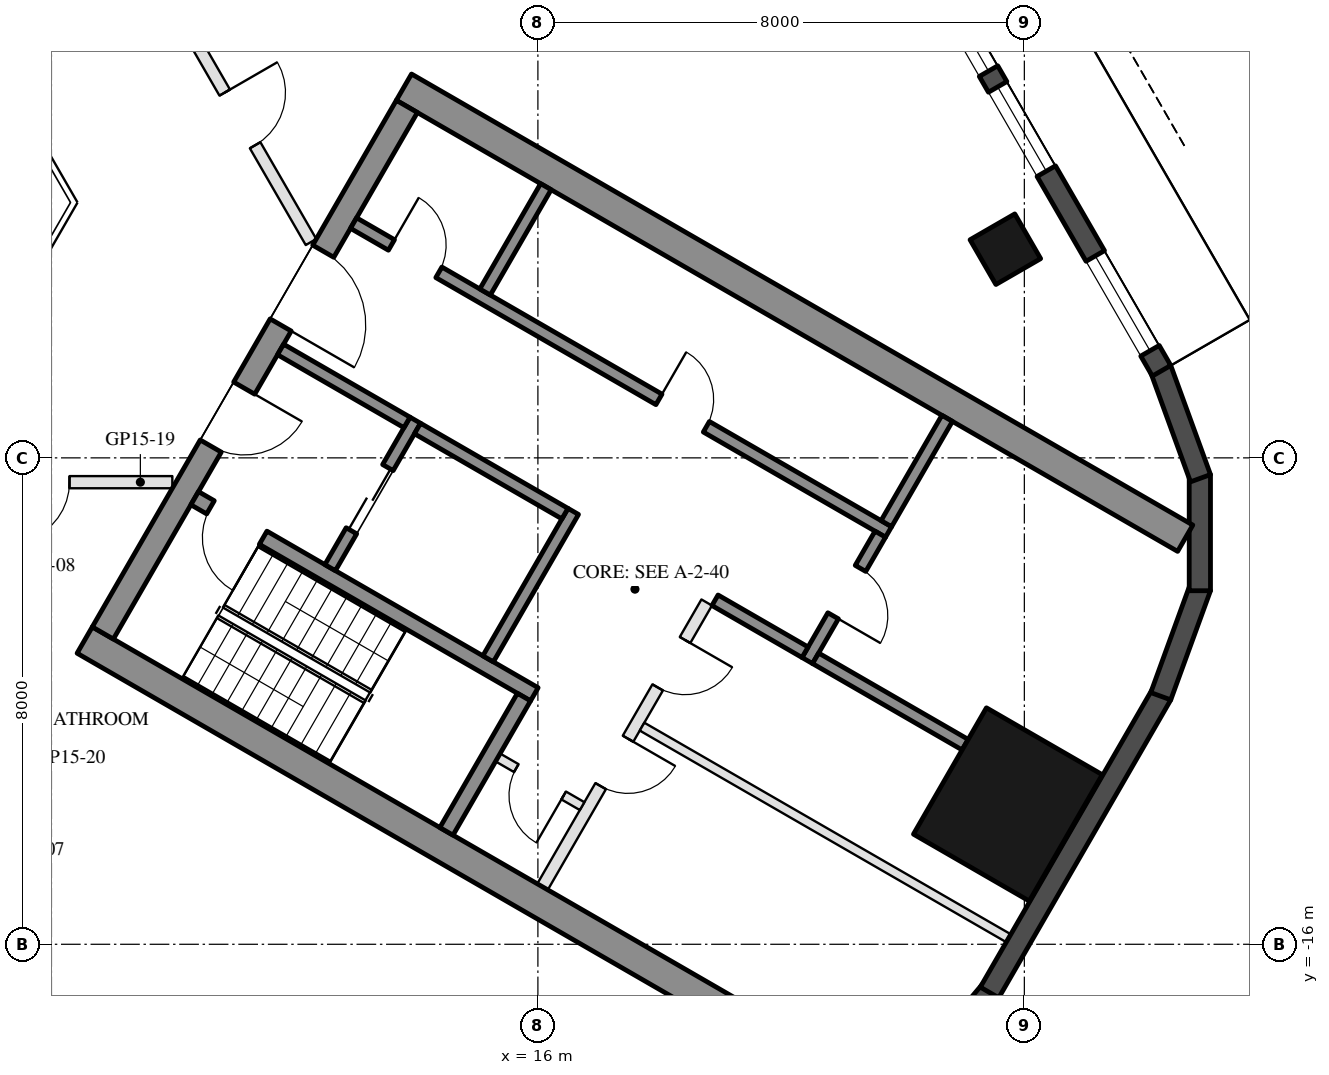
"""IFC4 building model, lengths in metres.
Left out: names, types, materials, properties, quantities, classifications, styles, units other than length and angle.
Written with IfcOpenShell. Run it as: python <this file> out.ifc"""

import sys

from ifc_helpers import new_model, si_unit, direction, frame, frame_2d, origin, origin_2d, place, context, subcontext, project, spatial, rectangle, hollow_rectangle, extrude, element, fill, save


model = new_model("IFC4")
c1 = context("Model", 3, precision=1e-05, world=origin(), true_north=direction((0.0, 1.0)))
c2 = subcontext(c1, "Body", "Model", "MODEL_VIEW")
j1 = project(units=[si_unit("LENGTHUNIT", "METRE"), si_unit("PLANEANGLEUNIT", "RADIAN")], contexts=[c1])
p1 = place(None, origin())
s1 = spatial("IfcSite", under=j1, at=p1, CompositionType="ELEMENT")
p2 = place(p1, origin())
s2 = spatial("IfcBuilding", under=s1, at=p2, CompositionType="ELEMENT")
p3 = place(p2, frame((0.0, 0.0, 172.5)))
s3 = spatial("IfcBuildingStorey", under=s2, at=p3, CompositionType="ELEMENT", Elevation=172.5)
p4 = place(p3, frame((23.688, -4.568, 0.0), z_axis=(0.0, 0.0, 1.0), x_axis=(-0.5, 0.866025403784, 0.0)))
e1 = element("IfcColumn", 1, at=p4, inside=s3, PredefinedType="COLUMN", context=c2, shape_type="SweptSolid", body=[
    extrude(hollow_rectangle(XDim=0.85, YDim=0.85, WallThickness=0.04, at=origin_2d()), origin(), (0.0, 0.0, 1.0), 3.7),
])
p5 = place(p3, frame((23.729, -13.7, 0.0), z_axis=(0.0, 0.0, 1.0), x_axis=(0.5, 0.866025403784, 0.0)))
e2 = element("IfcColumn", 2, at=p5, inside=s3, PredefinedType="COLUMN", context=c2, shape_type="SweptSolid", body=[
    extrude(hollow_rectangle(XDim=2.4, YDim=2.2, WallThickness=0.06, at=origin_2d()), origin(), (0.0, 0.0, 1.0), 3.7),
])
p6 = place(p3, frame((22.217, -18.231, 0.0), z_axis=(0.0, 0.0, 1.0), x_axis=(0.642733291068, 0.76609001857, 0.0)))
e3 = element("IfcWall", 3, at=p6, inside=s3, PredefinedType="SOLIDWALL", context=c2, shape_type="SweptSolid", body=[
    extrude(rectangle(XDim=1.91, YDim=0.35, at=frame_2d((0.955, 0.0))), origin(), (0.0, 0.0, 1.0), 3.55),
])
p7 = place(p3, frame((23.427, -16.792, 0.0), z_axis=(0.0, 0.0, 1.0), x_axis=(0.500018773155, 0.866014564827, 0.0)))
e4 = element("IfcWall", 4, at=p7, inside=s3, PredefinedType="SOLIDWALL", context=c2, shape_type="SweptSolid", body=[
    extrude(rectangle(XDim=5.658, YDim=0.35, at=frame_2d((2.829, 0.0))), origin(), (0.0, 0.0, 1.0), 3.55),
])
for number, where, z_axis, x_axis in (
    (5, (26.244, -11.92, 0.0), (0.0, 0.0, 1.0), (0.342, 0.94, 0.0)),
    (6, (26.886, -10.185, 0.0), (0.0, 0.0, 1.0), (0.0, 1.0, 0.0)),
    (7, (26.897, -8.335, 0.0), (0.0, 0.0, 1.0), (-0.342, 0.94, 0.0)),
):
    element("IfcWall", number, at=place(p3, frame(where, z_axis=z_axis, x_axis=x_axis)), inside=s3, PredefinedType="SOLIDWALL", context=c2, shape_type="SweptSolid", body=[
        extrude(rectangle(XDim=1.91, YDim=0.35, at=frame_2d((0.955, 0.0))), origin(), (0.0, 0.0, 1.0), 3.55),
    ])
p8 = place(p3, frame((26.257, -6.567, 0.0), z_axis=(0.0, 0.0, 1.0), x_axis=(-0.500023526245, 0.866011820475, 0.0)))
e8 = element("IfcWall", 8, at=p8, inside=s3, PredefinedType="SOLIDWALL", context=c2, shape_type="SweptSolid", body=[
    extrude(rectangle(XDim=11.816, YDim=0.35, at=frame_2d((5.908, 0.0))), origin(), (0.0, 0.0, 1.0), 3.55),
])
p9 = place(p8, frame((0.38, 0.0, 0.3)))
e9 = element("IfcOpeningElement", 9, at=p9, cuts=e8, PredefinedType="OPENING", context=c2, shape_type="SweptSolid", body=[
    extrude(rectangle(XDim=1.8, YDim=2.65, at=frame_2d((0.9, 1.325))), frame((0.0, 0.185, 0.0), z_axis=(0.0, -1.0, 0.0), x_axis=(1.0, 0.0, 0.0)), (0.0, 0.0, 1.0), 0.37),
])
p10 = place(p8, frame((7.741, 0.0, 0.0)))
e10 = element("IfcOpeningElement", 10, at=p10, cuts=e8, PredefinedType="OPENING", context=c2, shape_type="SweptSolid", body=[
    extrude(rectangle(XDim=2.4, YDim=2.4, at=frame_2d((1.2, 1.2))), frame((0.0, 0.185, 0.0), z_axis=(0.0, -1.0, 0.0), x_axis=(1.0, 0.0, 0.0)), (0.0, 0.0, 1.0), 0.37),
])
p11 = place(p8, frame((3.791, 0.0, 0.3)))
e11 = element("IfcOpeningElement", 11, at=p11, cuts=e8, PredefinedType="OPENING", context=c2, shape_type="SweptSolid", body=[
    extrude(rectangle(XDim=1.6, YDim=2.65, at=frame_2d((0.8, 1.325))), frame((0.0, 0.185, 0.0), z_axis=(0.0, -1.0, 0.0), x_axis=(1.0, 0.0, 0.0)), (0.0, 0.0, 1.0), 0.37),
])
p12 = place(p8, frame((5.691, 0.0, 0.3)))
e12 = element("IfcOpeningElement", 12, at=p12, cuts=e8, PredefinedType="OPENING", context=c2, shape_type="SweptSolid", body=[
    extrude(rectangle(XDim=1.6, YDim=2.65, at=frame_2d((0.8, 1.325))), frame((0.0, 0.185, 0.0), z_axis=(0.0, -1.0, 0.0), x_axis=(1.0, 0.0, 0.0)), (0.0, 0.0, 1.0), 0.37),
])
for number, where, z_axis, x_axis in (
    (13, (8.547, -10.997, 0.0), (0.0, 0.0, 1.0), (0.866, -0.5, 0.0)),
    (14, (13.797, -1.903, 0.0), (0.0, 0.0, 1.0), (0.866, -0.5, 0.0)),
):
    element("IfcWall", number, at=place(p3, frame(where, z_axis=z_axis, x_axis=x_axis)), inside=s3, PredefinedType="SHEAR", context=c2, shape_type="SweptSolid", body=[
        extrude(rectangle(XDim=14.837, YDim=0.5, at=frame_2d((7.418, 0.0))), origin(), (0.0, 0.0, 1.0), 3.5),
    ])
p13 = place(p3, frame((8.845, -10.88, 0.0), z_axis=(0.0, 0.0, 1.0), x_axis=(0.500004234368, 0.866022959057, 0.0)))
e15 = element("IfcWall", 15, at=p13, inside=s3, PredefinedType="SHEAR", context=c2, shape_type="SweptSolid", body=[
    extrude(rectangle(XDim=10.0, YDim=0.4, at=frame_2d((5.0, 0.0))), origin(), (0.0, 0.0, 1.0), 3.5),
])
p14 = place(p13, frame((3.55, 0.0, 0.0)))
e16 = element("IfcOpeningElement", 16, at=p14, cuts=e15, PredefinedType="OPENING", context=c2, shape_type="SweptSolid", body=[
    extrude(rectangle(XDim=1.1, YDim=2.1, at=frame_2d((0.55, 1.05))), frame((0.0, 0.21, 0.0), z_axis=(0.0, -1.0, 0.0), x_axis=(1.0, 0.0, 0.0)), (0.0, 0.0, 1.0), 0.42),
])
p15 = place(p13, frame((5.85, 0.0, 0.0)))
e17 = element("IfcOpeningElement", 17, at=p15, cuts=e15, PredefinedType="OPENING", context=c2, shape_type="SweptSolid", body=[
    extrude(rectangle(XDim=1.4, YDim=2.1, at=frame_2d((0.7, 1.05))), frame((0.0, 0.21, 0.0), z_axis=(0.0, -1.0, 0.0), x_axis=(1.0, 0.0, 0.0)), (0.0, 0.0, 1.0), 0.42),
])
p16 = place(p3, frame((10.356, -8.664, 0.0), z_axis=(0.0, 0.0, 1.0), x_axis=(0.866028629588, -0.499994412703, 0.0)))
e18 = element("IfcWall", 18, at=p16, inside=s3, PredefinedType="SHEAR", context=c2, shape_type="SweptSolid", body=[
    extrude(rectangle(XDim=6.45, YDim=0.25, at=frame_2d((3.225, 0.0))), origin(), (0.0, 0.0, 1.0), 3.5),
])
p17 = place(p16, frame((0.3, 0.0, 0.0)))
e19 = element("IfcOpeningElement", 19, at=p17, cuts=e18, PredefinedType="OPENING", context=c2, shape_type="SweptSolid", body=[
    extrude(rectangle(XDim=1.0, YDim=2.1, at=frame_2d((0.5, 1.05))), frame((0.0, 0.135, 0.0), z_axis=(0.0, -1.0, 0.0), x_axis=(1.0, 0.0, 0.0)), (0.0, 0.0, 1.0), 0.27),
])
p18 = place(p3, frame((14.496, -14.143, 0.0), z_axis=(0.0, 0.0, 1.0), x_axis=(0.500062241894, 0.865989465428, 0.0)))
e20 = element("IfcWall", 20, at=p18, inside=s3, PredefinedType="SHEAR", context=c2, shape_type="SweptSolid", body=[
    extrude(rectangle(XDim=2.55, YDim=0.25, at=frame_2d((1.275, 0.0))), origin(), (0.0, 0.0, 1.0), 3.5),
])
p19 = place(p3, frame((15.181, -11.305, 0.0), z_axis=(0.0, 0.0, 1.0), x_axis=(0.49994636267, 0.866056369097, 0.0)))
e21 = element("IfcWall", 21, at=p19, inside=s3, PredefinedType="SHEAR", context=c2, shape_type="SweptSolid", body=[
    extrude(rectangle(XDim=2.8, YDim=0.2, at=frame_2d((1.4, 0.0))), origin(), (0.0, 0.0, 1.0), 3.5),
])
p20 = place(p3, frame((12.583, -9.805, 0.0), z_axis=(0.0, 0.0, 1.0), x_axis=(0.49994636267, 0.866056369097, 0.0)))
e22 = element("IfcWall", 22, at=p20, inside=s3, PredefinedType="SHEAR", context=c2, shape_type="SweptSolid", body=[
    extrude(rectangle(XDim=2.8, YDim=0.2, at=frame_2d((1.4, 0.0))), origin(), (0.0, 0.0, 1.0), 3.5),
])
p21 = place(p20, frame((0.7, 0.0, 0.0)))
e23 = element("IfcOpeningElement", 23, at=p21, cuts=e22, PredefinedType="OPENING", context=c2, shape_type="SweptSolid", body=[
    extrude(rectangle(XDim=1.2, YDim=2.1, at=frame_2d((0.6, 1.05))), frame((0.0, 0.11, 0.0), z_axis=(0.0, -1.0, 0.0), x_axis=(1.0, 0.0, 0.0)), (0.0, 0.0, 1.0), 0.22),
])
p22 = place(p3, frame((11.768, -6.217, 0.0), z_axis=(0.0, 0.0, 1.0), x_axis=(0.866050077142, -0.499957262057, 0.0)))
e24 = element("IfcWall", 24, at=p22, inside=s3, PredefinedType="SHEAR", context=c2, shape_type="SweptSolid", body=[
    extrude(rectangle(XDim=2.4, YDim=0.2, at=frame_2d((1.2, 0.0))), origin(), (0.0, 0.0, 1.0), 3.5),
])
p23 = place(p3, frame((14.02, -7.517, 0.0), z_axis=(0.0, 0.0, 1.0), x_axis=(0.866034573852, -0.49998411664, 0.0)))
e25 = element("IfcWall", 25, at=p23, inside=s3, PredefinedType="SHEAR", context=c2, shape_type="SweptSolid", body=[
    extrude(rectangle(XDim=2.8, YDim=0.2, at=frame_2d((1.4, 0.0))), origin(), (0.0, 0.0, 1.0), 3.5),
])
p24 = place(p3, frame((12.968, -4.138, 0.0), z_axis=(0.0, 0.0, 1.0), x_axis=(0.866028328073, -0.49999493495, 0.0)))
e26 = element("IfcWall", 26, at=p24, inside=s3, PredefinedType="SHEAR", context=c2, shape_type="SweptSolid", body=[
    extrude(rectangle(XDim=10.16, YDim=0.2, at=frame_2d((5.08, 0.0))), origin(), (0.0, 0.0, 1.0), 3.5),
])
p25 = place(p24, frame((0.72, 0.0, 0.0)))
e27 = element("IfcOpeningElement", 27, at=p25, cuts=e26, PredefinedType="OPENING", context=c2, shape_type="SweptSolid", body=[
    extrude(rectangle(XDim=0.9, YDim=2.1, at=frame_2d((0.45, 1.05))), frame((0.0, 0.11, 0.0), z_axis=(0.0, -1.0, 0.0), x_axis=(1.0, 0.0, 0.0)), (0.0, 0.0, 1.0), 0.22),
])
p26 = place(p24, frame((5.8, 0.0, 0.0)))
e28 = element("IfcOpeningElement", 28, at=p26, cuts=e26, PredefinedType="OPENING", context=c2, shape_type="SweptSolid", body=[
    extrude(rectangle(XDim=0.9, YDim=2.1, at=frame_2d((0.45, 1.05))), frame((0.0, 0.11, 0.0), z_axis=(0.0, -1.0, 0.0), x_axis=(1.0, 0.0, 0.0)), (0.0, 0.0, 1.0), 0.22),
])
p27 = place(p3, frame((20.43, -11.333, 0.0), z_axis=(0.0, 0.0, 1.0), x_axis=(0.500001309137, 0.866024647952, 0.0)))
e29 = element("IfcWall", 29, at=p27, inside=s3, PredefinedType="SHEAR", context=c2, shape_type="SweptSolid", body=[
    extrude(rectangle(XDim=2.4, YDim=0.2, at=frame_2d((1.2, 0.0))), origin(), (0.0, 0.0, 1.0), 3.5),
])
p28 = place(p27, frame((0.85, 0.0, 0.0)))
e30 = element("IfcOpeningElement", 30, at=p28, cuts=e29, PredefinedType="OPENING", context=c2, shape_type="SweptSolid", body=[
    extrude(rectangle(XDim=0.9, YDim=2.1, at=frame_2d((0.45, 1.05))), frame((0.0, 0.11, 0.0), z_axis=(0.0, -1.0, 0.0), x_axis=(1.0, 0.0, 0.0)), (0.0, 0.0, 1.0), 0.22),
])
p29 = place(p3, frame((18.913, -10.342, 0.0), z_axis=(0.0, 0.0, 1.0), x_axis=(0.866038183914, -0.499977863513, 0.0)))
e31 = element("IfcWall", 31, at=p29, inside=s3, PredefinedType="SHEAR", context=c2, shape_type="SweptSolid", body=[
    extrude(rectangle(XDim=1.71, YDim=0.2, at=frame_2d((0.855, 0.0))), origin(), (0.0, 0.0, 1.0), 3.5),
])
for number, where, z_axis, x_axis in (
    (32, (15.131, -5.272, 0.0), (0.0, 0.0, 1.0), (0.5, 0.866, 0.0)),
    (33, (21.73, -9.082, 0.0), (0.0, 0.0, 1.0), (0.5, 0.866, 0.0)),
):
    element("IfcWall", number, at=place(p3, frame(where, z_axis=z_axis, x_axis=x_axis)), inside=s3, PredefinedType="SHEAR", context=c2, shape_type="SweptSolid", body=[
        extrude(rectangle(XDim=2.0, YDim=0.2, at=frame_2d((1.0, 0.0))), origin(), (0.0, 0.0, 1.0), 3.5),
    ])
p30 = place(p3, frame((20.567, -11.297, 0.0), z_axis=(0.0, 0.0, 1.0), x_axis=(0.866055327414, -0.49994816717, 0.0)))
e34 = element("IfcWall", 34, at=p30, inside=s3, PredefinedType="SHEAR", context=c2, shape_type="SweptSolid", body=[
    extrude(rectangle(XDim=2.84, YDim=0.2, at=frame_2d((1.42, 0.0))), origin(), (0.0, 0.0, 1.0), 3.5),
])
p31 = place(p3, frame((16.076, -15.055, 0.0), z_axis=(0.0, 0.0, 1.0), x_axis=(0.499995103361, 0.866028230842, 0.0)))
e35 = element("IfcWall", 35, at=p31, inside=s3, PredefinedType="PARTITIONING", context=c2, shape_type="SweptSolid", body=[
    extrude(rectangle(XDim=5.4, YDim=0.2, at=frame_2d((2.7, 0.0))), origin(), (0.0, 0.0, 1.0), 3.5),
])
p32 = place(p31, frame((1.913, 0.0, 0.0)))
e36 = element("IfcOpeningElement", 36, at=p32, cuts=e35, PredefinedType="OPENING", context=c2, shape_type="SweptSolid", body=[
    extrude(rectangle(XDim=0.9, YDim=2.1, at=frame_2d((0.45, 1.05))), frame((0.0, 0.11, 0.0), z_axis=(0.0, -1.0, 0.0), x_axis=(1.0, 0.0, 0.0)), (0.0, 0.0, 1.0), 0.22),
])
p33 = place(p31, frame((3.788, 0.0, 0.0)))
e37 = element("IfcOpeningElement", 37, at=p33, cuts=e35, PredefinedType="OPENING", context=c2, shape_type="SweptSolid", body=[
    extrude(rectangle(XDim=0.9, YDim=2.1, at=frame_2d((0.45, 1.05))), frame((0.0, 0.11, 0.0), z_axis=(0.0, -1.0, 0.0), x_axis=(1.0, 0.0, 0.0)), (0.0, 0.0, 1.0), 0.22),
])
p34 = place(p3, frame((15.342, -12.928, 0.0), z_axis=(0.0, 0.0, 1.0), x_axis=(0.865989903783, -0.500061482766, 0.0)))
e38 = element("IfcWall", 38, at=p34, inside=s3, PredefinedType="PARTITIONING", context=c2, shape_type="SweptSolid", body=[
    extrude(rectangle(XDim=1.6, YDim=0.15, at=frame_2d((0.8, 0.0))), origin(), (0.0, 0.0, 1.0), 3.5),
])
p35 = place(p34, frame((0.35, 0.0, 0.0)))
e39 = element("IfcOpeningElement", 39, at=p35, cuts=e38, PredefinedType="OPENING", context=c2, shape_type="SweptSolid", body=[
    extrude(rectangle(XDim=0.9, YDim=2.1, at=frame_2d((0.45, 1.05))), frame((0.0, 0.085, 0.0), z_axis=(0.0, -1.0, 0.0), x_axis=(1.0, 0.0, 0.0)), (0.0, 0.0, 1.0), 0.17),
])
p36 = place(p3, frame((17.713, -12.42, 0.0), z_axis=(0.0, 0.0, 1.0), x_axis=(0.866016523273, -0.500015381182, 0.0)))
e40 = element("IfcWall", 40, at=p36, inside=s3, PredefinedType="PARTITIONING", context=c2, shape_type="SweptSolid", body=[
    extrude(rectangle(XDim=6.95, YDim=0.15, at=frame_2d((3.475, 0.0))), origin(), (0.0, 0.0, 1.0), 3.5),
])
p37 = place(p3, frame((9.988, -8.4, 0.0), z_axis=(0.0, 0.0, 1.0), x_axis=(-1.0, 0.0, 0.0)))
e41 = element("IfcWall", 41, at=p37, inside=s3, PredefinedType="PARTITIONING", context=c2, shape_type="SweptSolid", body=[
    extrude(rectangle(XDim=4.383, YDim=0.2, at=frame_2d((2.191, 0.0))), origin(), (0.0, 0.0, 1.0), 2.95),
])
p38 = place(p37, frame((1.691, 0.0, 0.0)))
e42 = element("IfcOpeningElement", 42, at=p38, cuts=e41, PredefinedType="OPENING", context=c2, shape_type="SweptSolid", body=[
    extrude(rectangle(XDim=1.0, YDim=2.1, at=frame_2d((0.5, 1.05))), frame((0.0, 0.11, 0.0), z_axis=(0.0, -1.0, 0.0), x_axis=(1.0, 0.0, 0.0)), (0.0, 0.0, 1.0), 0.22),
])
p39 = place(p3, frame((9.931, -0.401, 0.0), z_axis=(0.0, 0.0, 1.0), x_axis=(0.5000418389, -0.866001246737, 0.0)))
e43 = element("IfcWall", 43, at=p39, inside=s3, PredefinedType="PARTITIONING", context=c2, shape_type="SweptSolid", body=[
    extrude(rectangle(XDim=4.676, YDim=0.2, at=frame_2d((2.338, 0.0))), origin(), (0.0, 0.0, 1.0), 2.95),
])
p40 = place(p39, frame((1.838, 0.0, 0.0)))
e44 = element("IfcOpeningElement", 44, at=p40, cuts=e43, PredefinedType="OPENING", context=c2, shape_type="SweptSolid", body=[
    extrude(rectangle(XDim=1.0, YDim=2.1, at=frame_2d((0.5, 1.05))), frame((0.0, 0.11, 0.0), z_axis=(0.0, -1.0, 0.0), x_axis=(1.0, 0.0, 0.0)), (0.0, 0.0, 1.0), 0.22),
])
p41 = place(p9, origin())
e45 = element("IfcWindow", 45, at=p41, inside=s3, PartitioningType="SINGLE_PANEL", PredefinedType="WINDOW", context=c2, shape_type="SweptSolid", body=[
    extrude(rectangle(XDim=1.8, YDim=2.65, at=frame_2d((0.9, 1.325))), frame((0.0, 0.03, 0.0), z_axis=(0.0, -1.0, 0.0), x_axis=(1.0, 0.0, 0.0)), (0.0, 0.0, 1.0), 0.06),
])
fill(e9, e45)
p42 = place(p11, origin())
e46 = element("IfcWindow", 46, at=p42, inside=s3, PartitioningType="SINGLE_PANEL", PredefinedType="WINDOW", context=c2, shape_type="SweptSolid", body=[
    extrude(rectangle(XDim=1.6, YDim=2.65, at=frame_2d((0.8, 1.325))), frame((0.0, 0.03, 0.0), z_axis=(0.0, -1.0, 0.0), x_axis=(1.0, 0.0, 0.0)), (0.0, 0.0, 1.0), 0.06),
])
fill(e11, e46)
p43 = place(p12, origin())
e47 = element("IfcWindow", 47, at=p43, inside=s3, PartitioningType="SINGLE_PANEL", PredefinedType="WINDOW", context=c2, shape_type="SweptSolid", body=[
    extrude(rectangle(XDim=1.6, YDim=2.65, at=frame_2d((0.8, 1.325))), frame((0.0, 0.03, 0.0), z_axis=(0.0, -1.0, 0.0), x_axis=(1.0, 0.0, 0.0)), (0.0, 0.0, 1.0), 0.06),
])
fill(e12, e47)
p44 = place(p21, origin())
e48 = element("IfcDoor", 48, at=p44, inside=s3, OperationType="DOUBLE_DOOR_SLIDING", PredefinedType="DOOR", context=c2, shape_type="SweptSolid", body=[
    extrude(rectangle(XDim=1.2, YDim=2.1, at=frame_2d((0.6, 1.05))), frame((0.0, 0.025, 0.0), z_axis=(0.0, -1.0, 0.0), x_axis=(1.0, 0.0, 0.0)), (0.0, 0.0, 1.0), 0.05),
])
fill(e23, e48)
p45 = place(p35, frame((0.9, 0.0, 0.0), z_axis=(0.0, 0.0, 1.0), x_axis=(-1.0, 0.0, 0.0)))
e49 = element("IfcDoor", 49, at=p45, inside=s3, OperationType="SINGLE_SWING_LEFT", PredefinedType="DOOR", context=c2, shape_type="SweptSolid", body=[
    extrude(rectangle(XDim=0.9, YDim=2.1, at=frame_2d((0.45, 1.05))), frame((0.0, 0.025, 0.0), z_axis=(0.0, -1.0, 0.0), x_axis=(1.0, 0.0, 0.0)), (0.0, 0.0, 1.0), 0.05),
])
fill(e39, e49)
p46 = place(p25, origin())
e50 = element("IfcDoor", 50, at=p46, inside=s3, OperationType="SINGLE_SWING_LEFT", PredefinedType="DOOR", context=c2, shape_type="SweptSolid", body=[
    extrude(rectangle(XDim=0.9, YDim=2.1, at=frame_2d((0.45, 1.05))), frame((0.0, 0.025, 0.0), z_axis=(0.0, -1.0, 0.0), x_axis=(1.0, 0.0, 0.0)), (0.0, 0.0, 1.0), 0.05),
])
fill(e27, e50)
p47 = place(p26, origin())
e51 = element("IfcDoor", 51, at=p47, inside=s3, OperationType="SINGLE_SWING_LEFT", PredefinedType="DOOR", context=c2, shape_type="SweptSolid", body=[
    extrude(rectangle(XDim=0.9, YDim=2.1, at=frame_2d((0.45, 1.05))), frame((0.0, 0.025, 0.0), z_axis=(0.0, -1.0, 0.0), x_axis=(1.0, 0.0, 0.0)), (0.0, 0.0, 1.0), 0.05),
])
fill(e28, e51)
p48 = place(p28, frame((0.9, 0.0, 0.0), z_axis=(0.0, 0.0, 1.0), x_axis=(-1.0, 0.0, 0.0)))
e52 = element("IfcDoor", 52, at=p48, inside=s3, OperationType="SINGLE_SWING_RIGHT", PredefinedType="DOOR", context=c2, shape_type="SweptSolid", body=[
    extrude(rectangle(XDim=0.9, YDim=2.1, at=frame_2d((0.45, 1.05))), frame((0.0, 0.025, 0.0), z_axis=(0.0, -1.0, 0.0), x_axis=(1.0, 0.0, 0.0)), (0.0, 0.0, 1.0), 0.05),
])
fill(e30, e52)
p49 = place(p32, frame((0.9, 0.0, 0.0), z_axis=(0.0, 0.0, 1.0), x_axis=(-1.0, 0.0, 0.0)))
e53 = element("IfcDoor", 53, at=p49, inside=s3, OperationType="SINGLE_SWING_LEFT", PredefinedType="DOOR", context=c2, shape_type="SweptSolid", body=[
    extrude(rectangle(XDim=0.9, YDim=2.1, at=frame_2d((0.45, 1.05))), frame((0.0, 0.025, 0.0), z_axis=(0.0, -1.0, 0.0), x_axis=(1.0, 0.0, 0.0)), (0.0, 0.0, 1.0), 0.05),
])
fill(e36, e53)
p50 = place(p33, frame((0.9, 0.0, 0.0), z_axis=(0.0, 0.0, 1.0), x_axis=(-1.0, 0.0, 0.0)))
e54 = element("IfcDoor", 54, at=p50, inside=s3, OperationType="SINGLE_SWING_LEFT", PredefinedType="DOOR", context=c2, shape_type="SweptSolid", body=[
    extrude(rectangle(XDim=0.9, YDim=2.1, at=frame_2d((0.45, 1.05))), frame((0.0, 0.025, 0.0), z_axis=(0.0, -1.0, 0.0), x_axis=(1.0, 0.0, 0.0)), (0.0, 0.0, 1.0), 0.05),
])
fill(e37, e54)
p51 = place(p14, frame((1.1, 0.0, 0.0), z_axis=(0.0, 0.0, 1.0), x_axis=(-1.0, 0.0, 0.0)))
e55 = element("IfcDoor", 55, at=p51, inside=s3, OperationType="SINGLE_SWING_LEFT", PredefinedType="DOOR", context=c2, shape_type="SweptSolid", body=[
    extrude(rectangle(XDim=1.1, YDim=2.1, at=frame_2d((0.55, 1.05))), frame((0.0, 0.025, 0.0), z_axis=(0.0, -1.0, 0.0), x_axis=(1.0, 0.0, 0.0)), (0.0, 0.0, 1.0), 0.05),
])
fill(e16, e55)
p52 = place(p15, frame((1.4, 0.0, 0.0), z_axis=(0.0, 0.0, 1.0), x_axis=(-1.0, 0.0, 0.0)))
e56 = element("IfcDoor", 56, at=p52, inside=s3, OperationType="DOUBLE_DOOR_SINGLE_SWING", PredefinedType="DOOR", context=c2, shape_type="SweptSolid", body=[
    extrude(rectangle(XDim=1.4, YDim=2.1, at=frame_2d((0.7, 1.05))), frame((0.0, 0.025, 0.0), z_axis=(0.0, -1.0, 0.0), x_axis=(1.0, 0.0, 0.0)), (0.0, 0.0, 1.0), 0.05),
])
fill(e17, e56)
p53 = place(p17, frame((1.0, 0.0, 0.0), z_axis=(0.0, 0.0, 1.0), x_axis=(-1.0, 0.0, 0.0)))
e57 = element("IfcDoor", 57, at=p53, inside=s3, OperationType="SINGLE_SWING_LEFT", PredefinedType="DOOR", context=c2, shape_type="SweptSolid", body=[
    extrude(rectangle(XDim=1.0, YDim=2.1, at=frame_2d((0.5, 1.05))), frame((0.0, 0.025, 0.0), z_axis=(0.0, -1.0, 0.0), x_axis=(1.0, 0.0, 0.0)), (0.0, 0.0, 1.0), 0.05),
])
fill(e19, e57)
p54 = place(p38, origin())
e58 = element("IfcDoor", 58, at=p54, inside=s3, OperationType="SINGLE_SWING_RIGHT", PredefinedType="DOOR", context=c2, shape_type="SweptSolid", body=[
    extrude(rectangle(XDim=1.0, YDim=2.1, at=frame_2d((0.5, 1.05))), frame((0.0, 0.025, 0.0), z_axis=(0.0, -1.0, 0.0), x_axis=(1.0, 0.0, 0.0)), (0.0, 0.0, 1.0), 0.05),
])
fill(e42, e58)
p55 = place(p40, origin())
e59 = element("IfcDoor", 59, at=p55, inside=s3, OperationType="SINGLE_SWING_LEFT", PredefinedType="DOOR", context=c2, shape_type="SweptSolid", body=[
    extrude(rectangle(XDim=1.0, YDim=2.1, at=frame_2d((0.5, 1.05))), frame((0.0, 0.025, 0.0), z_axis=(0.0, -1.0, 0.0), x_axis=(1.0, 0.0, 0.0)), (0.0, 0.0, 1.0), 0.05),
])
fill(e44, e59)
save(model, sys.argv[1])
